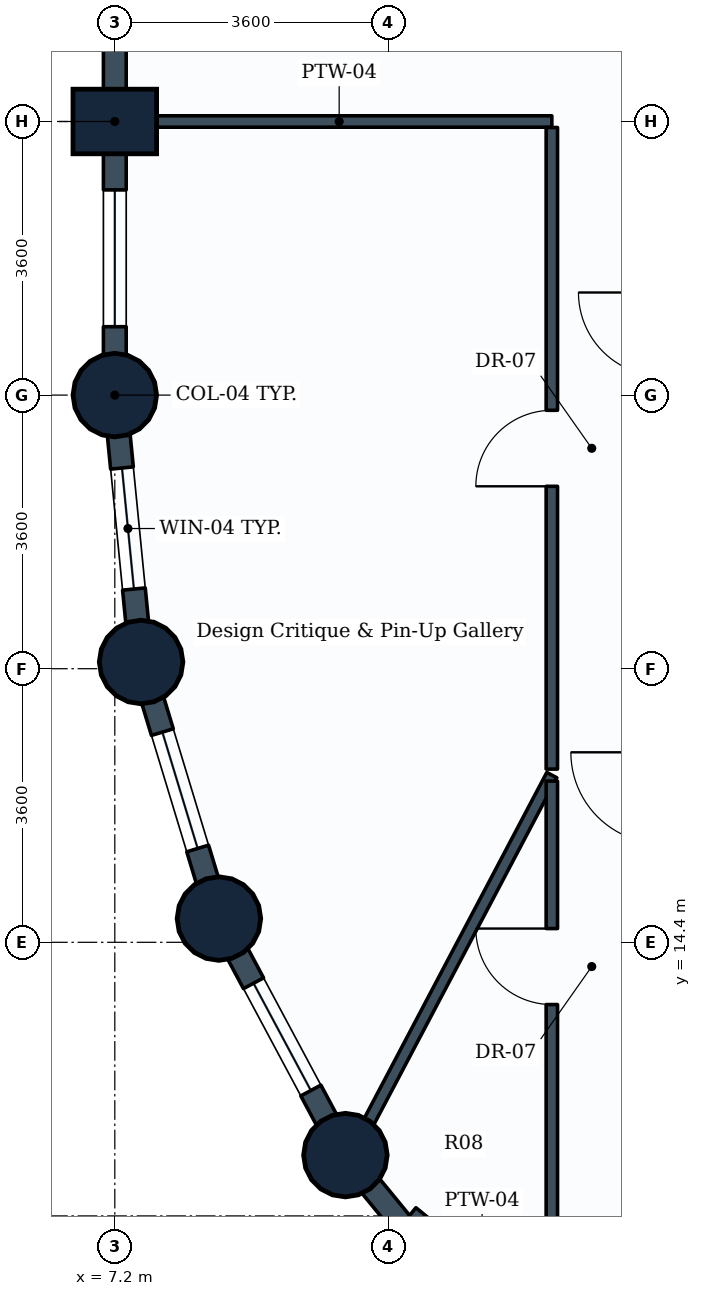
"""IFC4 building model, lengths in metres.
Left out: names, types, materials, properties, quantities, classifications, styles, units other than length and angle.
Written with IfcOpenShell. Run it as: python <this file> out.ifc"""

import sys

from ifc_helpers import new_model, si_unit, direction, frame, frame_2d, origin, origin_2d, place, context, subcontext, project, spatial, rectangle, circle, extrude, element, fill, save


model = new_model("IFC4")
c1 = context("Model", 3, precision=1e-05, world=origin(), true_north=direction((0.0, 1.0)))
c2 = subcontext(c1, "Body", "Model", "MODEL_VIEW")
j1 = project(units=[si_unit("LENGTHUNIT", "METRE"), si_unit("PLANEANGLEUNIT", "RADIAN")], contexts=[c1])
p1 = place(None, origin())
s1 = spatial("IfcSite", under=j1, at=p1, CompositionType="ELEMENT")
p2 = place(p1, origin())
s2 = spatial("IfcBuilding", under=s1, at=p2, CompositionType="ELEMENT")
p3 = place(p2, frame((0.0, 0.0, 103.5)))
s3 = spatial("IfcBuildingStorey", under=s2, at=p3, CompositionType="ELEMENT", Elevation=103.5)
p4 = place(p3, frame((7.2, 21.6, 0.0), z_axis=(0.0, 0.0, 1.0), x_axis=(1.0, 0.0, 0.0)))
e1 = element("IfcColumn", 1, at=p4, inside=s3, PredefinedType="COLUMN", context=c2, shape_type="SweptSolid", body=[
    extrude(circle(Radius=0.55, at=origin_2d()), origin(), (0.0, 0.0, 1.0), 3.9),
])
p5 = place(p3, frame((7.2, 25.2, 0.0), z_axis=(0.0, 0.0, 1.0), x_axis=(0.0, 1.0, 0.0)))
e2 = element("IfcColumn", 2, at=p5, inside=s3, PredefinedType="COLUMN", context=c2, shape_type="SweptSolid", body=[
    extrude(rectangle(XDim=0.85, YDim=1.1, at=origin_2d()), origin(), (0.0, 0.0, 1.0), 3.9),
])
for number, where, z_axis, x_axis in (
    (3, (7.546, 18.088, 0.0), (0.0, 0.0, 1.0), (1.0, 0.0, 0.0)),
    (4, (8.57, 14.712, 0.0), (0.0, 0.0, 1.0), (1.0, 0.0, 0.0)),
    (5, (10.234, 11.6, 0.0), (0.0, 0.0, 1.0), (1.0, 0.0, 0.0)),
):
    element("IfcColumn", number, at=place(p3, frame(where, z_axis=z_axis, x_axis=x_axis)), inside=s3, PredefinedType="COLUMN", context=c2, shape_type="SweptSolid", body=[
        extrude(circle(Radius=0.55, at=origin_2d()), origin(), (0.0, 0.0, 1.0), 3.9),
    ])
p6 = place(p3, frame((7.2, 25.2, 0.0), z_axis=(0.0, 0.0, 1.0), x_axis=(0.0, 1.0, 0.0)))
e6 = element("IfcWall", 6, at=p6, inside=s3, PredefinedType="STANDARD", context=c2, shape_type="SweptSolid", body=[
    extrude(rectangle(XDim=3.6, YDim=0.3, at=frame_2d((1.8, 0.0))), origin(), (0.0, 0.0, 1.0), 2.93),
])
p7 = place(p3, frame((7.2, 21.6, 0.0), z_axis=(0.0, 0.0, 1.0), x_axis=(0.0, 1.0, 0.0)))
e7 = element("IfcWall", 7, at=p7, inside=s3, PredefinedType="STANDARD", context=c2, shape_type="SweptSolid", body=[
    extrude(rectangle(XDim=3.6, YDim=0.3, at=frame_2d((1.8, 0.0))), origin(), (0.0, 0.0, 1.0), 2.93),
])
p8 = place(p7, frame((0.9, 0.0, 0.85)))
e8 = element("IfcOpeningElement", 8, at=p8, cuts=e7, PredefinedType="OPENING", context=c2, shape_type="SweptSolid", body=[
    extrude(rectangle(XDim=1.8, YDim=1.35, at=frame_2d((0.9, 0.675))), frame((0.0, 0.16, 0.0), z_axis=(0.0, -1.0, 0.0), x_axis=(1.0, 0.0, 0.0)), (0.0, 0.0, 1.0), 0.32),
])
p9 = place(p3, frame((7.546, 18.088, 0.0), z_axis=(0.0, 0.0, 1.0), x_axis=(-0.09802417461, 0.995184033831, 0.0)))
e9 = element("IfcWall", 9, at=p9, inside=s3, PredefinedType="STANDARD", context=c2, shape_type="SweptSolid", body=[
    extrude(rectangle(XDim=3.529, YDim=0.3, at=frame_2d((1.765, 0.0))), origin(), (0.0, 0.0, 1.0), 2.93),
])
p10 = place(p9, frame((0.965, 0.0, 0.85)))
e10 = element("IfcOpeningElement", 10, at=p10, cuts=e9, PredefinedType="OPENING", context=c2, shape_type="SweptSolid", body=[
    extrude(rectangle(XDim=1.6, YDim=1.35, at=frame_2d((0.8, 0.675))), frame((0.0, 0.16, 0.0), z_axis=(0.0, -1.0, 0.0), x_axis=(1.0, 0.0, 0.0)), (0.0, 0.0, 1.0), 0.32),
])
p11 = place(p3, frame((8.57, 14.712, 0.0), z_axis=(0.0, 0.0, 1.0), x_axis=(-0.290305086481, 0.956934144423, 0.0)))
e11 = element("IfcWall", 11, at=p11, inside=s3, PredefinedType="STANDARD", context=c2, shape_type="SweptSolid", body=[
    extrude(rectangle(XDim=3.528, YDim=0.3, at=frame_2d((1.764, 0.0))), origin(), (0.0, 0.0, 1.0), 2.93),
])
p12 = place(p11, frame((0.964, 0.0, 0.85)))
e12 = element("IfcOpeningElement", 12, at=p12, cuts=e11, PredefinedType="OPENING", context=c2, shape_type="SweptSolid", body=[
    extrude(rectangle(XDim=1.6, YDim=1.35, at=frame_2d((0.8, 0.675))), frame((0.0, 0.16, 0.0), z_axis=(0.0, -1.0, 0.0), x_axis=(1.0, 0.0, 0.0)), (0.0, 0.0, 1.0), 0.32),
])
p13 = place(p3, frame((10.234, 11.6, 0.0), z_axis=(0.0, 0.0, 1.0), x_axis=(-0.47151087309, 0.881860247748, 0.0)))
e13 = element("IfcWall", 13, at=p13, inside=s3, PredefinedType="STANDARD", context=c2, shape_type="SweptSolid", body=[
    extrude(rectangle(XDim=3.529, YDim=0.3, at=frame_2d((1.764, 0.0))), origin(), (0.0, 0.0, 1.0), 2.93),
])
p14 = place(p13, frame((0.964, 0.0, 0.85)))
e14 = element("IfcOpeningElement", 14, at=p14, cuts=e13, PredefinedType="OPENING", context=c2, shape_type="SweptSolid", body=[
    extrude(rectangle(XDim=1.6, YDim=1.35, at=frame_2d((0.8, 0.675))), frame((0.0, 0.16, 0.0), z_axis=(0.0, -1.0, 0.0), x_axis=(1.0, 0.0, 0.0)), (0.0, 0.0, 1.0), 0.32),
])
p15 = place(p3, frame((12.472, 8.872, 0.0), z_axis=(0.0, 0.0, 1.0), x_axis=(-0.634258295121, 0.773121216285, 0.0)))
e15 = element("IfcWall", 15, at=p15, inside=s3, PredefinedType="STANDARD", context=c2, shape_type="SweptSolid", body=[
    extrude(rectangle(XDim=3.529, YDim=0.3, at=frame_2d((1.764, 0.0))), origin(), (0.0, 0.0, 1.0), 2.93),
])
p16 = place(p3, frame((7.354, 25.2, 0.0), z_axis=(0.0, 0.0, 1.0), x_axis=(1.0, 0.0, 0.0)))
e16 = element("IfcWall", 16, at=p16, inside=s3, PredefinedType="PARTITIONING", context=c2, shape_type="SweptSolid", body=[
    extrude(rectangle(XDim=5.596, YDim=0.15, at=frame_2d((2.798, 0.0))), origin(), (0.0, 0.0, 1.0), 3.635),
])
p17 = place(p3, frame((12.95, 9.35, 0.0), z_axis=(0.0, 0.0, 1.0), x_axis=(-0.774315108081, 0.632800216022, 0.0)))
e17 = element("IfcWall", 17, at=p17, inside=s3, PredefinedType="PARTITIONING", context=c2, shape_type="SweptSolid", body=[
    extrude(rectangle(XDim=2.37, YDim=0.15, at=frame_2d((1.185, 0.0))), origin(), (0.0, 0.0, 1.0), 2.93),
])
p18 = place(p3, frame((12.95, 16.6, 0.0), z_axis=(0.0, 0.0, 1.0), x_axis=(-0.466710911312, -0.884409930554, 0.0)))
e18 = element("IfcWall", 18, at=p18, inside=s3, PredefinedType="PARTITIONING", context=c2, shape_type="SweptSolid", body=[
    extrude(rectangle(XDim=5.559, YDim=0.15, at=frame_2d((2.78, 0.0))), origin(), (0.0, 0.0, 1.0), 2.93),
])
p19 = place(p3, frame((12.95, 16.679, 0.0), z_axis=(0.0, 0.0, 1.0), x_axis=(0.0, 1.0, 0.0)))
e19 = element("IfcWall", 19, at=p19, inside=s3, PredefinedType="PARTITIONING", context=c2, shape_type="SweptSolid", body=[
    extrude(rectangle(XDim=8.442, YDim=0.15, at=frame_2d((4.221, 0.0))), origin(), (0.0, 0.0, 1.0), 3.19),
])
p20 = place(p19, frame((3.721, 0.0, 0.0)))
e20 = element("IfcOpeningElement", 20, at=p20, cuts=e19, PredefinedType="OPENING", context=c2, shape_type="SweptSolid", body=[
    extrude(rectangle(XDim=1.0, YDim=2.1, at=frame_2d((0.5, 1.05))), frame((0.0, 0.085, 0.0), z_axis=(0.0, -1.0, 0.0), x_axis=(1.0, 0.0, 0.0)), (0.0, 0.0, 1.0), 0.17),
])
p21 = place(p3, frame((12.95, 8.634, 0.0), z_axis=(0.0, 0.0, 1.0), x_axis=(0.0, 1.0, 0.0)))
e21 = element("IfcWall", 21, at=p21, inside=s3, PredefinedType="PARTITIONING", context=c2, shape_type="SweptSolid", body=[
    extrude(rectangle(XDim=7.887, YDim=0.15, at=frame_2d((3.944, 0.0))), origin(), (0.0, 0.0, 1.0), 2.93),
])
p22 = place(p21, frame((4.947, 0.0, 0.0)))
e22 = element("IfcOpeningElement", 22, at=p22, cuts=e21, PredefinedType="OPENING", context=c2, shape_type="SweptSolid", body=[
    extrude(rectangle(XDim=1.0, YDim=2.1, at=frame_2d((0.5, 1.05))), frame((0.0, 0.085, 0.0), z_axis=(0.0, -1.0, 0.0), x_axis=(1.0, 0.0, 0.0)), (0.0, 0.0, 1.0), 0.17),
])
p23 = place(p8, origin())
e23 = element("IfcWindow", 23, at=p23, inside=s3, PartitioningType="SINGLE_PANEL", PredefinedType="WINDOW", context=c2, shape_type="SweptSolid", body=[
    extrude(rectangle(XDim=1.8, YDim=1.35, at=frame_2d((0.9, 0.675))), frame((0.0, 0.03, 0.0), z_axis=(0.0, -1.0, 0.0), x_axis=(1.0, 0.0, 0.0)), (0.0, 0.0, 1.0), 0.06),
])
fill(e8, e23)
p24 = place(p10, origin())
e24 = element("IfcWindow", 24, at=p24, inside=s3, PartitioningType="SINGLE_PANEL", PredefinedType="WINDOW", context=c2, shape_type="SweptSolid", body=[
    extrude(rectangle(XDim=1.6, YDim=1.35, at=frame_2d((0.8, 0.675))), frame((0.0, 0.03, 0.0), z_axis=(0.0, -1.0, 0.0), x_axis=(1.0, 0.0, 0.0)), (0.0, 0.0, 1.0), 0.06),
])
fill(e10, e24)
p25 = place(p12, origin())
e25 = element("IfcWindow", 25, at=p25, inside=s3, PartitioningType="SINGLE_PANEL", PredefinedType="WINDOW", context=c2, shape_type="SweptSolid", body=[
    extrude(rectangle(XDim=1.6, YDim=1.35, at=frame_2d((0.8, 0.675))), frame((0.0, 0.03, 0.0), z_axis=(0.0, -1.0, 0.0), x_axis=(1.0, 0.0, 0.0)), (0.0, 0.0, 1.0), 0.06),
])
fill(e12, e25)
p26 = place(p14, origin())
e26 = element("IfcWindow", 26, at=p26, inside=s3, PartitioningType="SINGLE_PANEL", PredefinedType="WINDOW", context=c2, shape_type="SweptSolid", body=[
    extrude(rectangle(XDim=1.6, YDim=1.35, at=frame_2d((0.8, 0.675))), frame((0.0, 0.03, 0.0), z_axis=(0.0, -1.0, 0.0), x_axis=(1.0, 0.0, 0.0)), (0.0, 0.0, 1.0), 0.06),
])
fill(e14, e26)
p27 = place(p20, origin())
e27 = element("IfcDoor", 27, at=p27, inside=s3, OperationType="SINGLE_SWING_LEFT", PredefinedType="DOOR", context=c2, shape_type="SweptSolid", body=[
    extrude(rectangle(XDim=1.0, YDim=2.1, at=frame_2d((0.5, 1.05))), frame((0.0, 0.025, 0.0), z_axis=(0.0, -1.0, 0.0), x_axis=(1.0, 0.0, 0.0)), (0.0, 0.0, 1.0), 0.05),
])
fill(e20, e27)
p28 = place(p22, origin())
e28 = element("IfcDoor", 28, at=p28, inside=s3, OperationType="SINGLE_SWING_RIGHT", PredefinedType="DOOR", context=c2, shape_type="SweptSolid", body=[
    extrude(rectangle(XDim=1.0, YDim=2.1, at=frame_2d((0.5, 1.05))), frame((0.0, 0.025, 0.0), z_axis=(0.0, -1.0, 0.0), x_axis=(1.0, 0.0, 0.0)), (0.0, 0.0, 1.0), 0.05),
])
fill(e22, e28)
save(model, sys.argv[1])
